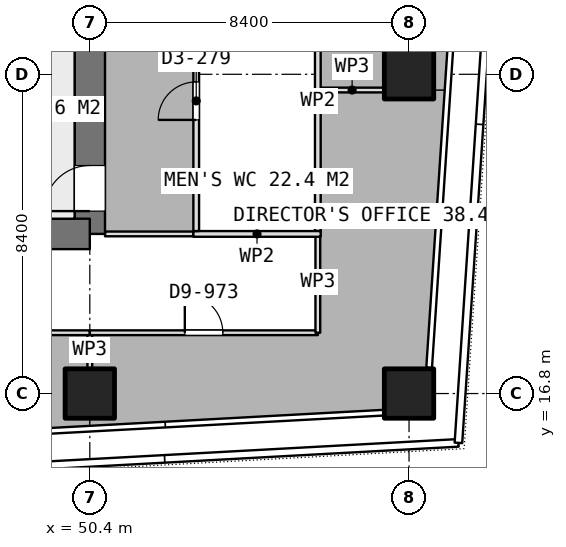
"""IFC4 building model, lengths in metres.
Left out: names, types, materials, properties, quantities, classifications, styles, units other than length and angle.
Written with IfcOpenShell. Run it as: python <this file> out.ifc"""

import sys

from ifc_helpers import new_model, si_unit, direction, frame, frame_2d, origin, origin_2d, place, context, subcontext, project, spatial, rectangle, extrude, element, fill, save


model = new_model("IFC4")
c1 = context("Model", 3, precision=1e-05, world=origin(), true_north=direction((0.0, 1.0)))
c2 = subcontext(c1, "Body", "Model", "MODEL_VIEW")
j1 = project(units=[si_unit("LENGTHUNIT", "METRE"), si_unit("PLANEANGLEUNIT", "RADIAN")], contexts=[c1])
p1 = place(None, origin())
s1 = spatial("IfcSite", under=j1, at=p1, CompositionType="ELEMENT")
p2 = place(p1, origin())
s2 = spatial("IfcBuilding", under=s1, at=p2, CompositionType="ELEMENT")
p3 = place(p2, frame((0.0, 0.0, 261.35)))
s3 = spatial("IfcBuildingStorey", under=s2, at=p3, CompositionType="ELEMENT", Elevation=261.35)
p4 = place(p3, frame((40.0, 21.0, 0.0), z_axis=(0.0, 0.0, 1.0), x_axis=(1.0, 0.0, 0.0)))
e1 = element("IfcWall", 1, at=p4, inside=s3, PredefinedType="SHEAR", context=c2, shape_type="SweptSolid", body=[
    extrude(rectangle(XDim=10.4, YDim=0.8, at=frame_2d((5.2, 0.0))), origin(), (0.0, 0.0, 1.0), 3.75),
])
p5 = place(p3, frame((50.4, 21.0, 0.0), z_axis=(0.0, 0.0, 1.0), x_axis=(0.0, 1.0, 0.0)))
e2 = element("IfcWall", 2, at=p5, inside=s3, PredefinedType="SHEAR", context=c2, shape_type="SweptSolid", body=[
    extrude(rectangle(XDim=25.2, YDim=0.8, at=frame_2d((12.6, 0.0))), origin(), (0.0, 0.0, 1.0), 3.75),
])
p6 = place(p5, frame((16.2, 0.0, 0.0)))
e3 = element("IfcOpeningElement", 3, at=p6, cuts=e2, PredefinedType="OPENING", context=c2, shape_type="SweptSolid", body=[
    extrude(rectangle(XDim=1.2, YDim=2.1, at=frame_2d((0.6, 1.05))), frame((0.0, 0.41, 0.0), z_axis=(0.0, -1.0, 0.0), x_axis=(1.0, 0.0, 0.0)), (0.0, 0.0, 1.0), 0.82),
])
p7 = place(p5, frame((10.05, 0.0, 0.0)))
e4 = element("IfcOpeningElement", 4, at=p7, cuts=e2, PredefinedType="OPENING", context=c2, shape_type="SweptSolid", body=[
    extrude(rectangle(XDim=0.9, YDim=2.1, at=frame_2d((0.45, 1.05))), frame((0.0, 0.41, 0.0), z_axis=(0.0, -1.0, 0.0), x_axis=(1.0, 0.0, 0.0)), (0.0, 0.0, 1.0), 0.82),
])
p8 = place(p5, frame((7.45, 0.0, 0.0)))
e5 = element("IfcOpeningElement", 5, at=p8, cuts=e2, PredefinedType="OPENING", context=c2, shape_type="SweptSolid", body=[
    extrude(rectangle(XDim=0.9, YDim=2.1, at=frame_2d((0.45, 1.05))), frame((0.0, 0.41, 0.0), z_axis=(0.0, -1.0, 0.0), x_axis=(1.0, 0.0, 0.0)), (0.0, 0.0, 1.0), 0.82),
])
p9 = place(p5, frame((0.6, 0.0, 0.0)))
e6 = element("IfcOpeningElement", 6, at=p9, cuts=e2, PredefinedType="OPENING", context=c2, shape_type="SweptSolid", body=[
    extrude(rectangle(XDim=1.2, YDim=2.1, at=frame_2d((0.6, 1.05))), frame((0.0, 0.41, 0.0), z_axis=(0.0, -1.0, 0.0), x_axis=(1.0, 0.0, 0.0)), (0.0, 0.0, 1.0), 0.82),
])
for number, where, z_axis, x_axis in (
    (7, (50.4, 16.8, 0.0), (0.0, 0.0, 1.0), (1.0, 0.0, 0.0)),
    (8, (58.8, 16.8, 0.0), (0.0, 0.0, 1.0), (1.0, 0.0, 0.0)),
    (9, (58.8, 25.2, 0.0), (0.0, 0.0, 1.0), (1.0, 0.0, 0.0)),
):
    element("IfcColumn", number, at=place(p3, frame(where, z_axis=z_axis, x_axis=x_axis)), inside=s3, PredefinedType="COLUMN", context=c2, shape_type="SweptSolid", body=[
        extrude(rectangle(XDim=1.3, YDim=1.3, at=origin_2d()), origin(), (0.0, 0.0, 1.0), 3.75),
    ])
p10 = place(p3, frame((53.125, 21.0, 0.0), z_axis=(0.0, 0.0, 1.0), x_axis=(1.0, 0.0, 0.0)))
e10 = element("IfcWall", 10, at=p10, inside=s3, PredefinedType="PARTITIONING", context=c2, shape_type="SweptSolid", body=[
    extrude(rectangle(XDim=3.35, YDim=0.15, at=frame_2d((1.675, 0.0))), origin(), (0.0, 0.0, 1.0), 3.5),
])
p11 = place(p3, frame((53.2, 21.075, 0.0), z_axis=(0.0, 0.0, 1.0), x_axis=(0.0, 1.0, 0.0)))
e11 = element("IfcWall", 11, at=p11, inside=s3, PredefinedType="PARTITIONING", context=c2, shape_type="SweptSolid", body=[
    extrude(rectangle(XDim=6.85, YDim=0.15, at=frame_2d((3.425, 0.0))), origin(), (0.0, 0.0, 1.0), 3.5),
])
p12 = place(p11, frame((2.925, 0.0, 0.0)))
e12 = element("IfcOpeningElement", 12, at=p12, cuts=e11, PredefinedType="OPENING", context=c2, shape_type="SweptSolid", body=[
    extrude(rectangle(XDim=1.0, YDim=2.1, at=frame_2d((0.5, 1.05))), frame((0.0, 0.085, 0.0), z_axis=(0.0, -1.0, 0.0), x_axis=(1.0, 0.0, 0.0)), (0.0, 0.0, 1.0), 0.17),
])
p13 = place(p3, frame((56.4, 21.075, 0.0), z_axis=(0.0, 0.0, 1.0), x_axis=(0.0, 1.0, 0.0)))
e13 = element("IfcWall", 13, at=p13, inside=s3, PredefinedType="PARTITIONING", context=c2, shape_type="SweptSolid", body=[
    extrude(rectangle(XDim=6.85, YDim=0.15, at=frame_2d((3.425, 0.0))), origin(), (0.0, 0.0, 1.0), 3.5),
])
p14 = place(p3, frame((50.4, 18.4, 0.0), z_axis=(0.0, 0.0, 1.0), x_axis=(0.0, -1.0, 0.0)))
e14 = element("IfcWall", 14, at=p14, inside=s3, PredefinedType="PARTITIONING", context=c2, shape_type="SweptSolid", body=[
    extrude(rectangle(XDim=0.93, YDim=0.125, at=frame_2d((0.465, 0.0))), origin(), (0.0, 0.0, 1.0), 3.5),
])
p15 = place(p3, frame((42.674, 18.4, 0.0), z_axis=(0.0, 0.0, 1.0), x_axis=(1.0, 0.0, 0.0)))
e15 = element("IfcWall", 15, at=p15, inside=s3, PredefinedType="PARTITIONING", context=c2, shape_type="SweptSolid", body=[
    extrude(rectangle(XDim=7.726, YDim=0.125, at=frame_2d((3.863, 0.0))), origin(), (0.0, 0.0, 1.0), 3.5),
])
p16 = place(p15, frame((3.363, 0.0, 0.0)))
e16 = element("IfcOpeningElement", 16, at=p16, cuts=e15, PredefinedType="OPENING", context=c2, shape_type="SweptSolid", body=[
    extrude(rectangle(XDim=1.0, YDim=2.1, at=frame_2d((0.5, 1.05))), frame((0.0, 0.073, 0.0), z_axis=(0.0, -1.0, 0.0), x_axis=(1.0, 0.0, 0.0)), (0.0, 0.0, 1.0), 0.145),
])
p17 = place(p3, frame((56.475, 24.786, 0.0), z_axis=(0.0, 0.0, 1.0), x_axis=(1.0, 0.0, 0.0)))
e17 = element("IfcWall", 17, at=p17, inside=s3, PredefinedType="PARTITIONING", context=c2, shape_type="SweptSolid", body=[
    extrude(rectangle(XDim=1.655, YDim=0.125, at=frame_2d((0.827, 0.0))), origin(), (0.0, 0.0, 1.0), 3.5),
])
p18 = place(p3, frame((50.401, 18.4, 0.0), z_axis=(0.0, 0.0, 1.0), x_axis=(1.0, 0.0, 0.0)))
e18 = element("IfcWall", 18, at=p18, inside=s3, PredefinedType="PARTITIONING", context=c2, shape_type="SweptSolid", body=[
    extrude(rectangle(XDim=5.999, YDim=0.125, at=frame_2d((3.0, 0.0))), origin(), (0.0, 0.0, 1.0), 3.5),
])
p19 = place(p18, frame((2.499, 0.0, 0.0)))
e19 = element("IfcOpeningElement", 19, at=p19, cuts=e18, PredefinedType="OPENING", context=c2, shape_type="SweptSolid", body=[
    extrude(rectangle(XDim=1.0, YDim=2.1, at=frame_2d((0.5, 1.05))), frame((0.0, 0.073, 0.0), z_axis=(0.0, -1.0, 0.0), x_axis=(1.0, 0.0, 0.0)), (0.0, 0.0, 1.0), 0.145),
])
p20 = place(p3, frame((56.4, 18.4, 0.0), z_axis=(0.0, 0.0, 1.0), x_axis=(0.0, 1.0, 0.0)))
e20 = element("IfcWall", 20, at=p20, inside=s3, PredefinedType="PARTITIONING", context=c2, shape_type="SweptSolid", body=[
    extrude(rectangle(XDim=2.675, YDim=0.125, at=frame_2d((1.337, 0.0))), origin(), (0.0, 0.0, 1.0), 3.5),
])
p21 = place(p3, frame((53.124, 21.0, 0.0), z_axis=(0.0, 0.0, 1.0), x_axis=(-1.0, 0.0, 0.0)))
e21 = element("IfcWall", 21, at=p21, inside=s3, PredefinedType="PARTITIONING", context=c2, shape_type="SweptSolid", body=[
    extrude(rectangle(XDim=2.324, YDim=0.125, at=frame_2d((1.162, 0.0))), origin(), (0.0, 0.0, 1.0), 3.5),
])
p22 = place(p12, origin())
e22 = element("IfcDoor", 22, at=p22, inside=s3, OperationType="SINGLE_SWING_LEFT", PredefinedType="DOOR", context=c2, shape_type="SweptSolid", body=[
    extrude(rectangle(XDim=1.0, YDim=2.1, at=frame_2d((0.5, 1.05))), frame((0.0, 0.025, 0.0), z_axis=(0.0, -1.0, 0.0), x_axis=(1.0, 0.0, 0.0)), (0.0, 0.0, 1.0), 0.05),
])
fill(e12, e22)
p23 = place(p19, origin())
e23 = element("IfcDoor", 23, at=p23, inside=s3, OperationType="SINGLE_SWING_LEFT", PredefinedType="DOOR", context=c2, shape_type="SweptSolid", body=[
    extrude(rectangle(XDim=1.0, YDim=2.1, at=frame_2d((0.5, 1.05))), frame((0.0, 0.025, 0.0), z_axis=(0.0, -1.0, 0.0), x_axis=(1.0, 0.0, 0.0)), (0.0, 0.0, 1.0), 0.05),
])
fill(e19, e23)
p24 = place(p9, origin())
e24 = element("IfcDoor", 24, at=p24, inside=s3, OperationType="SINGLE_SWING_RIGHT", PredefinedType="DOOR", context=c2, shape_type="SweptSolid", body=[
    extrude(rectangle(XDim=1.2, YDim=2.1, at=frame_2d((0.6, 1.05))), frame((0.0, 0.025, 0.0), z_axis=(0.0, -1.0, 0.0), x_axis=(1.0, 0.0, 0.0)), (0.0, 0.0, 1.0), 0.05),
])
fill(e6, e24)
save(model, sys.argv[1])
